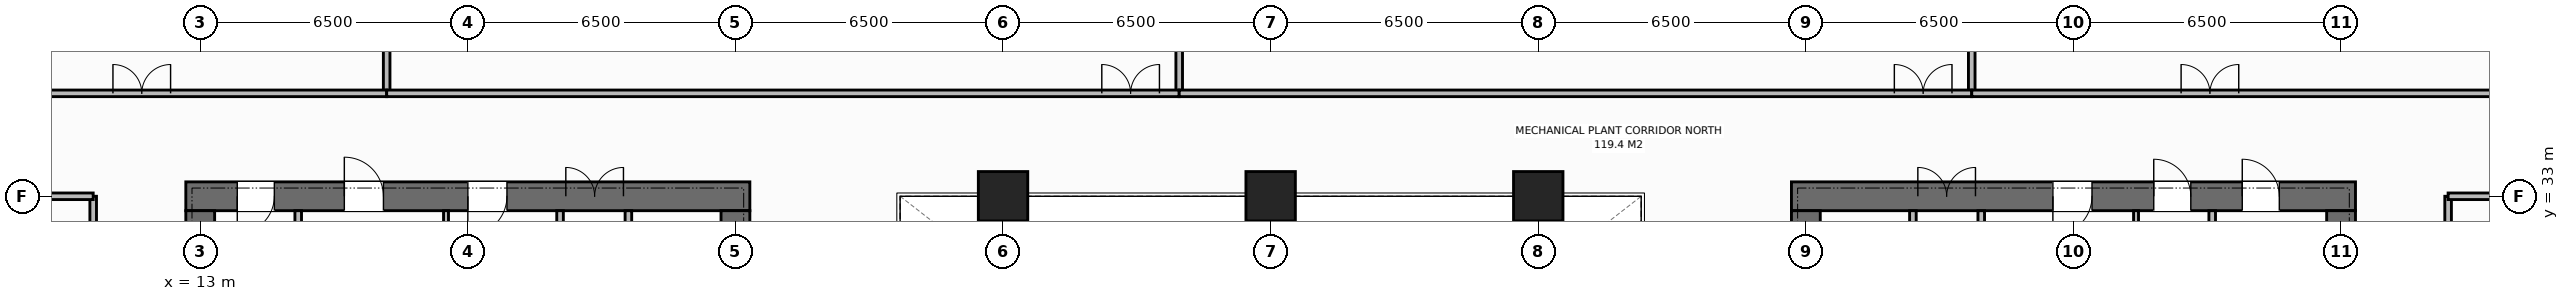
"""IFC4 building model, lengths in metres.
Left out: names, types, materials, properties, quantities, classifications, styles, units other than length and angle.
Written with IfcOpenShell. Run it as: python <this file> out.ifc"""

import sys

from ifc_helpers import new_model, si_unit, direction, frame, frame_2d, origin, origin_2d, place, context, subcontext, project, spatial, rectangle, extrude, element, fill, save


model = new_model("IFC4")
c1 = context("Model", 3, precision=1e-05, world=origin(), true_north=direction((0.0, 1.0)))
c2 = subcontext(c1, "Body", "Model", "MODEL_VIEW")
j1 = project(units=[si_unit("LENGTHUNIT", "METRE"), si_unit("PLANEANGLEUNIT", "RADIAN")], contexts=[c1])
p1 = place(None, origin())
s1 = spatial("IfcSite", under=j1, at=p1, CompositionType="ELEMENT")
p2 = place(p1, origin())
s2 = spatial("IfcBuilding", under=s1, at=p2, CompositionType="ELEMENT")
p3 = place(p2, frame((0.0, 0.0, 139.2)))
s3 = spatial("IfcBuildingStorey", under=s2, at=p3, CompositionType="ELEMENT", Elevation=139.2)
p4 = place(p3, frame((12.65, 33.0, 0.0), z_axis=(0.0, 0.0, 1.0), x_axis=(1.0, 0.0, 0.0)))
e1 = element("IfcWall", 1, at=p4, inside=s3, PredefinedType="SHEAR", context=c2, shape_type="SweptSolid", body=[
    extrude(rectangle(XDim=13.7, YDim=0.7, at=frame_2d((6.85, 0.0))), origin(), (0.0, 0.0, 1.0), 5.0),
])
p5 = place(p4, frame((1.25, 0.0, 0.0)))
e2 = element("IfcOpeningElement", 2, at=p5, cuts=e1, PredefinedType="OPENING", context=c2, shape_type="SweptSolid", body=[
    extrude(rectangle(XDim=0.9, YDim=2.15, at=frame_2d((0.45, 1.075))), frame((0.0, 0.36, 0.0), z_axis=(0.0, -1.0, 0.0), x_axis=(1.0, 0.0, 0.0)), (0.0, 0.0, 1.0), 0.72),
])
p6 = place(p4, frame((3.85, 0.0, 0.0)))
e3 = element("IfcOpeningElement", 3, at=p6, cuts=e1, PredefinedType="OPENING", context=c2, shape_type="SweptSolid", body=[
    extrude(rectangle(XDim=0.95, YDim=2.15, at=frame_2d((0.475, 1.075))), frame((0.0, 0.36, 0.0), z_axis=(0.0, -1.0, 0.0), x_axis=(1.0, 0.0, 0.0)), (0.0, 0.0, 1.0), 0.72),
])
p7 = place(p4, frame((6.85, 0.0, 0.0)))
e4 = element("IfcOpeningElement", 4, at=p7, cuts=e1, PredefinedType="OPENING", context=c2, shape_type="SweptSolid", body=[
    extrude(rectangle(XDim=0.95, YDim=2.15, at=frame_2d((0.475, 1.075))), frame((0.0, 0.36, 0.0), z_axis=(0.0, -1.0, 0.0), x_axis=(1.0, 0.0, 0.0)), (0.0, 0.0, 1.0), 0.72),
])
p8 = place(p4, frame((9.23, 0.0, 0.0)))
e5 = element("IfcOpeningElement", 5, at=p8, cuts=e1, PredefinedType="OPENING", context=c2, shape_type="SweptSolid", body=[
    extrude(rectangle(XDim=1.4, YDim=2.2, at=frame_2d((0.7, 1.1))), frame((0.0, 0.36, 0.0), z_axis=(0.0, -1.0, 0.0), x_axis=(1.0, 0.0, 0.0)), (0.0, 0.0, 1.0), 0.72),
])
p9 = place(p3, frame((13.0, 19.35, 0.0), z_axis=(0.0, 0.0, 1.0), x_axis=(0.0, 1.0, 0.0)))
e6 = element("IfcWall", 6, at=p9, inside=s3, PredefinedType="SHEAR", context=c2, shape_type="SweptSolid", body=[
    extrude(rectangle(XDim=13.3, YDim=0.7, at=frame_2d((6.65, 0.0))), origin(), (0.0, 0.0, 1.0), 5.0),
])
p10 = place(p9, frame((4.7, 0.0, 0.0)))
e7 = element("IfcOpeningElement", 7, at=p10, cuts=e6, PredefinedType="OPENING", context=c2, shape_type="SweptSolid", body=[
    extrude(rectangle(XDim=1.4, YDim=2.2, at=frame_2d((0.7, 1.1))), frame((0.0, 0.36, 0.0), z_axis=(0.0, -1.0, 0.0), x_axis=(1.0, 0.0, 0.0)), (0.0, 0.0, 1.0), 0.72),
])
p11 = place(p3, frame((26.0, 19.35, 0.0), z_axis=(0.0, 0.0, 1.0), x_axis=(0.0, 1.0, 0.0)))
e8 = element("IfcWall", 8, at=p11, inside=s3, PredefinedType="SHEAR", context=c2, shape_type="SweptSolid", body=[
    extrude(rectangle(XDim=13.3, YDim=0.7, at=frame_2d((6.65, 0.0))), origin(), (0.0, 0.0, 1.0), 5.0),
])
p12 = place(p3, frame((51.65, 33.0, 0.0), z_axis=(0.0, 0.0, 1.0), x_axis=(1.0, 0.0, 0.0)))
e9 = element("IfcWall", 9, at=p12, inside=s3, PredefinedType="SHEAR", context=c2, shape_type="SweptSolid", body=[
    extrude(rectangle(XDim=13.7, YDim=0.7, at=frame_2d((6.85, 0.0))), origin(), (0.0, 0.0, 1.0), 5.0),
])
p13 = place(p12, frame((3.07, 0.0, 0.0)))
e10 = element("IfcOpeningElement", 10, at=p13, cuts=e9, PredefinedType="OPENING", context=c2, shape_type="SweptSolid", body=[
    extrude(rectangle(XDim=1.4, YDim=2.2, at=frame_2d((0.7, 1.1))), frame((0.0, 0.36, 0.0), z_axis=(0.0, -1.0, 0.0), x_axis=(1.0, 0.0, 0.0)), (0.0, 0.0, 1.0), 0.72),
])
p14 = place(p12, frame((10.95, 0.0, 0.0)))
e11 = element("IfcOpeningElement", 11, at=p14, cuts=e9, PredefinedType="OPENING", context=c2, shape_type="SweptSolid", body=[
    extrude(rectangle(XDim=0.9, YDim=2.15, at=frame_2d((0.45, 1.075))), frame((0.0, 0.36, 0.0), z_axis=(0.0, -1.0, 0.0), x_axis=(1.0, 0.0, 0.0)), (0.0, 0.0, 1.0), 0.72),
])
p15 = place(p12, frame((6.35, 0.0, 0.0)))
e12 = element("IfcOpeningElement", 12, at=p15, cuts=e9, PredefinedType="OPENING", context=c2, shape_type="SweptSolid", body=[
    extrude(rectangle(XDim=0.95, YDim=2.15, at=frame_2d((0.475, 1.075))), frame((0.0, 0.36, 0.0), z_axis=(0.0, -1.0, 0.0), x_axis=(1.0, 0.0, 0.0)), (0.0, 0.0, 1.0), 0.72),
])
p16 = place(p12, frame((8.8, 0.0, 0.0)))
e13 = element("IfcOpeningElement", 13, at=p16, cuts=e9, PredefinedType="OPENING", context=c2, shape_type="SweptSolid", body=[
    extrude(rectangle(XDim=0.9, YDim=2.15, at=frame_2d((0.45, 1.075))), frame((0.0, 0.36, 0.0), z_axis=(0.0, -1.0, 0.0), x_axis=(1.0, 0.0, 0.0)), (0.0, 0.0, 1.0), 0.72),
])
p17 = place(p3, frame((52.0, 19.35, 0.0), z_axis=(0.0, 0.0, 1.0), x_axis=(0.0, 1.0, 0.0)))
e14 = element("IfcWall", 14, at=p17, inside=s3, PredefinedType="SHEAR", context=c2, shape_type="SweptSolid", body=[
    extrude(rectangle(XDim=13.3, YDim=0.7, at=frame_2d((6.65, 0.0))), origin(), (0.0, 0.0, 1.0), 5.0),
])
p18 = place(p3, frame((65.0, 19.35, 0.0), z_axis=(0.0, 0.0, 1.0), x_axis=(0.0, 1.0, 0.0)))
e15 = element("IfcWall", 15, at=p18, inside=s3, PredefinedType="SHEAR", context=c2, shape_type="SweptSolid", body=[
    extrude(rectangle(XDim=13.3, YDim=0.7, at=frame_2d((6.65, 0.0))), origin(), (0.0, 0.0, 1.0), 5.0),
])
p19 = place(p18, frame((8.1, 0.0, 0.0)))
e16 = element("IfcOpeningElement", 16, at=p19, cuts=e15, PredefinedType="OPENING", context=c2, shape_type="SweptSolid", body=[
    extrude(rectangle(XDim=1.3, YDim=2.2, at=frame_2d((0.65, 1.1))), frame((0.0, 0.36, 0.0), z_axis=(0.0, -1.0, 0.0), x_axis=(1.0, 0.0, 0.0)), (0.0, 0.0, 1.0), 0.72),
])
for number, where, z_axis, x_axis in (
    (17, (32.5, 33.0, 0.0), (0.0, 0.0, 1.0), (1.0, 0.0, 0.0)),
    (18, (39.0, 33.0, 0.0), (0.0, 0.0, 1.0), (1.0, 0.0, 0.0)),
    (19, (45.5, 33.0, 0.0), (0.0, 0.0, 1.0), (1.0, 0.0, 0.0)),
):
    element("IfcColumn", number, at=place(p3, frame(where, z_axis=z_axis, x_axis=x_axis)), inside=s3, PredefinedType="COLUMN", context=c2, shape_type="SweptSolid", body=[
        extrude(rectangle(XDim=1.2, YDim=1.2, at=origin_2d()), origin(), (0.0, 0.0, 1.0), 5.0),
    ])
p20 = place(p3, frame((15.38, 26.56, 0.0), z_axis=(0.0, 0.0, 1.0), x_axis=(0.0, 1.0, 0.0)))
e20 = element("IfcWall", 20, at=p20, inside=s3, PredefinedType="STANDARD", context=c2, shape_type="SweptSolid", body=[
    extrude(rectangle(XDim=6.09, YDim=0.16, at=frame_2d((3.045, 0.0))), origin(), (0.0, 0.0, 1.0), 4.772),
])
p21 = place(p3, frame((18.97, 26.56, 0.0), z_axis=(0.0, 0.0, 1.0), x_axis=(0.0, 1.0, 0.0)))
e21 = element("IfcWall", 21, at=p21, inside=s3, PredefinedType="PARTITIONING", context=c2, shape_type="SweptSolid", body=[
    extrude(rectangle(XDim=6.09, YDim=0.12, at=frame_2d((3.045, 0.0))), origin(), (0.0, 0.0, 1.0), 4.772),
])
p22 = place(p3, frame((21.74, 26.56, 0.0), z_axis=(0.0, 0.0, 1.0), x_axis=(0.0, 1.0, 0.0)))
e22 = element("IfcWall", 22, at=p22, inside=s3, PredefinedType="STANDARD", context=c2, shape_type="SweptSolid", body=[
    extrude(rectangle(XDim=6.09, YDim=0.16, at=frame_2d((3.045, 0.0))), origin(), (0.0, 0.0, 1.0), 4.772),
])
p23 = place(p3, frame((23.4, 19.35, 0.0), z_axis=(0.0, 0.0, 1.0), x_axis=(0.0, 1.0, 0.0)))
e23 = element("IfcWall", 23, at=p23, inside=s3, PredefinedType="STANDARD", context=c2, shape_type="SweptSolid", body=[
    extrude(rectangle(XDim=13.3, YDim=0.16, at=frame_2d((6.65, 0.0))), origin(), (0.0, 0.0, 1.0), 4.772),
])
p24 = place(p23, frame((1.65, 0.0, 0.0)))
e24 = element("IfcOpeningElement", 24, at=p24, cuts=e23, PredefinedType="OPENING", context=c2, shape_type="SweptSolid", body=[
    extrude(rectangle(XDim=0.95, YDim=2.15, at=frame_2d((0.475, 1.075))), frame((0.0, 0.09, 0.0), z_axis=(0.0, -1.0, 0.0), x_axis=(1.0, 0.0, 0.0)), (0.0, 0.0, 1.0), 0.18),
])
p25 = place(p23, frame((4.95, 0.0, 0.0)))
e25 = element("IfcOpeningElement", 25, at=p25, cuts=e23, PredefinedType="OPENING", context=c2, shape_type="SweptSolid", body=[
    extrude(rectangle(XDim=1.1, YDim=2.2, at=frame_2d((0.55, 1.1))), frame((0.0, 0.09, 0.0), z_axis=(0.0, -1.0, 0.0), x_axis=(1.0, 0.0, 0.0)), (0.0, 0.0, 1.0), 0.18),
])
p26 = place(p23, frame((7.1, 0.0, 0.0)))
e26 = element("IfcOpeningElement", 26, at=p26, cuts=e23, PredefinedType="OPENING", context=c2, shape_type="SweptSolid", body=[
    extrude(rectangle(XDim=1.1, YDim=2.2, at=frame_2d((0.55, 1.1))), frame((0.0, 0.09, 0.0), z_axis=(0.0, -1.0, 0.0), x_axis=(1.0, 0.0, 0.0)), (0.0, 0.0, 1.0), 0.18),
])
p27 = place(p3, frame((54.6, 19.35, 0.0), z_axis=(0.0, 0.0, 1.0), x_axis=(0.0, 1.0, 0.0)))
e27 = element("IfcWall", 27, at=p27, inside=s3, PredefinedType="STANDARD", context=c2, shape_type="SweptSolid", body=[
    extrude(rectangle(XDim=13.3, YDim=0.16, at=frame_2d((6.65, 0.0))), origin(), (0.0, 0.0, 1.0), 4.772),
])
p28 = place(p27, frame((1.65, 0.0, 0.0)))
e28 = element("IfcOpeningElement", 28, at=p28, cuts=e27, PredefinedType="OPENING", context=c2, shape_type="SweptSolid", body=[
    extrude(rectangle(XDim=0.95, YDim=2.15, at=frame_2d((0.475, 1.075))), frame((0.0, 0.09, 0.0), z_axis=(0.0, -1.0, 0.0), x_axis=(1.0, 0.0, 0.0)), (0.0, 0.0, 1.0), 0.18),
])
p29 = place(p27, frame((4.95, 0.0, 0.0)))
e29 = element("IfcOpeningElement", 29, at=p29, cuts=e27, PredefinedType="OPENING", context=c2, shape_type="SweptSolid", body=[
    extrude(rectangle(XDim=1.1, YDim=2.2, at=frame_2d((0.55, 1.1))), frame((0.0, 0.09, 0.0), z_axis=(0.0, -1.0, 0.0), x_axis=(1.0, 0.0, 0.0)), (0.0, 0.0, 1.0), 0.18),
])
p30 = place(p27, frame((7.1, 0.0, 0.0)))
e30 = element("IfcOpeningElement", 30, at=p30, cuts=e27, PredefinedType="OPENING", context=c2, shape_type="SweptSolid", body=[
    extrude(rectangle(XDim=1.1, YDim=2.2, at=frame_2d((0.55, 1.1))), frame((0.0, 0.09, 0.0), z_axis=(0.0, -1.0, 0.0), x_axis=(1.0, 0.0, 0.0)), (0.0, 0.0, 1.0), 0.18),
])
p31 = place(p3, frame((56.26, 23.09, 0.0), z_axis=(0.0, 0.0, 1.0), x_axis=(0.0, 1.0, 0.0)))
e31 = element("IfcWall", 31, at=p31, inside=s3, PredefinedType="STANDARD", context=c2, shape_type="SweptSolid", body=[
    extrude(rectangle(XDim=9.56, YDim=0.16, at=frame_2d((4.78, 0.0))), origin(), (0.0, 0.0, 1.0), 4.772),
])
p32 = place(p31, frame((1.01, 0.0, 0.0)))
e32 = element("IfcOpeningElement", 32, at=p32, cuts=e31, PredefinedType="OPENING", context=c2, shape_type="SweptSolid", body=[
    extrude(rectangle(XDim=1.3, YDim=2.2, at=frame_2d((0.65, 1.1))), frame((0.0, 0.09, 0.0), z_axis=(0.0, -1.0, 0.0), x_axis=(1.0, 0.0, 0.0)), (0.0, 0.0, 1.0), 0.18),
])
p33 = place(p3, frame((61.87, 26.56, 0.0), z_axis=(0.0, 0.0, 1.0), x_axis=(0.0, 1.0, 0.0)))
e33 = element("IfcWall", 33, at=p33, inside=s3, PredefinedType="STANDARD", context=c2, shape_type="SweptSolid", body=[
    extrude(rectangle(XDim=6.09, YDim=0.16, at=frame_2d((3.045, 0.0))), origin(), (0.0, 0.0, 1.0), 4.772),
])
p34 = place(p3, frame((60.02, 26.56, 0.0), z_axis=(0.0, 0.0, 1.0), x_axis=(0.0, 1.0, 0.0)))
e34 = element("IfcWall", 34, at=p34, inside=s3, PredefinedType="PARTITIONING", context=c2, shape_type="SweptSolid", body=[
    extrude(rectangle(XDim=6.09, YDim=0.12, at=frame_2d((3.045, 0.0))), origin(), (0.0, 0.0, 1.0), 4.772),
])
p35 = place(p3, frame((10.4, 19.0, 0.0), z_axis=(0.0, 0.0, 1.0), x_axis=(0.0, 1.0, 0.0)))
e35 = element("IfcWall", 35, at=p35, inside=s3, PredefinedType="STANDARD", context=c2, shape_type="SweptSolid", body=[
    extrude(rectangle(XDim=14.0, YDim=0.16, at=frame_2d((7.0, 0.0))), origin(), (0.0, 0.0, 1.0), 4.772),
])
p36 = place(p35, frame((5.2, 0.0, 0.0)))
e36 = element("IfcOpeningElement", 36, at=p36, cuts=e35, PredefinedType="OPENING", context=c2, shape_type="SweptSolid", body=[
    extrude(rectangle(XDim=1.4, YDim=2.2, at=frame_2d((0.7, 1.1))), frame((0.0, 0.09, 0.0), z_axis=(0.0, -1.0, 0.0), x_axis=(1.0, 0.0, 0.0)), (0.0, 0.0, 1.0), 0.18),
])
p37 = place(p3, frame((1.82, 33.0, 0.0), z_axis=(0.0, 0.0, 1.0), x_axis=(1.0, 0.0, 0.0)))
e37 = element("IfcWall", 37, at=p37, inside=s3, PredefinedType="STANDARD", context=c2, shape_type="SweptSolid", body=[
    extrude(rectangle(XDim=8.58, YDim=0.16, at=frame_2d((4.29, 0.0))), origin(), (0.0, 0.0, 1.0), 3.252),
])
p38 = place(p3, frame((67.6, 19.0, 0.0), z_axis=(0.0, 0.0, 1.0), x_axis=(0.0, 1.0, 0.0)))
e38 = element("IfcWall", 38, at=p38, inside=s3, PredefinedType="STANDARD", context=c2, shape_type="SweptSolid", body=[
    extrude(rectangle(XDim=14.0, YDim=0.16, at=frame_2d((7.0, 0.0))), origin(), (0.0, 0.0, 1.0), 4.772),
])
p39 = place(p38, frame((5.2, 0.0, 0.0)))
e39 = element("IfcOpeningElement", 39, at=p39, cuts=e38, PredefinedType="OPENING", context=c2, shape_type="SweptSolid", body=[
    extrude(rectangle(XDim=1.4, YDim=2.2, at=frame_2d((0.7, 1.1))), frame((0.0, 0.09, 0.0), z_axis=(0.0, -1.0, 0.0), x_axis=(1.0, 0.0, 0.0)), (0.0, 0.0, 1.0), 0.18),
])
p40 = place(p3, frame((67.6, 33.0, 0.0), z_axis=(0.0, 0.0, 1.0), x_axis=(1.0, 0.0, 0.0)))
e40 = element("IfcWall", 40, at=p40, inside=s3, PredefinedType="STANDARD", context=c2, shape_type="SweptSolid", body=[
    extrude(rectangle(XDim=8.58, YDim=0.16, at=frame_2d((4.29, 0.0))), origin(), (0.0, 0.0, 1.0), 3.252),
])
p41 = place(p3, frame((17.528, 35.5, 0.0), z_axis=(0.0, 0.0, 1.0), x_axis=(0.0, 1.0, 0.0)))
e41 = element("IfcWall", 41, at=p41, inside=s3, PredefinedType="STANDARD", context=c2, shape_type="SweptSolid", body=[
    extrude(rectangle(XDim=13.71, YDim=0.16, at=frame_2d((6.855, 0.0))), origin(), (0.0, 0.0, 1.0), 4.772),
])
p42 = place(p3, frame((1.82, 35.5, 0.0), z_axis=(0.0, 0.0, 1.0), x_axis=(1.0, 0.0, 0.0)))
e42 = element("IfcWall", 42, at=p42, inside=s3, PredefinedType="STANDARD", context=c2, shape_type="SweptSolid", body=[
    extrude(rectangle(XDim=15.708, YDim=0.16, at=frame_2d((7.854, 0.0))), origin(), (0.0, 0.0, 1.0), 4.772),
])
p43 = place(p42, frame((9.06, 0.0, 0.0)))
e43 = element("IfcOpeningElement", 43, at=p43, cuts=e42, PredefinedType="OPENING", context=c2, shape_type="SweptSolid", body=[
    extrude(rectangle(XDim=1.4, YDim=2.2, at=frame_2d((0.7, 1.1))), frame((0.0, 0.09, 0.0), z_axis=(0.0, -1.0, 0.0), x_axis=(1.0, 0.0, 0.0)), (0.0, 0.0, 1.0), 0.18),
])
p44 = place(p3, frame((36.779, 35.5, 0.0), z_axis=(0.0, 0.0, 1.0), x_axis=(0.0, 1.0, 0.0)))
e44 = element("IfcWall", 44, at=p44, inside=s3, PredefinedType="STANDARD", context=c2, shape_type="SweptSolid", body=[
    extrude(rectangle(XDim=13.71, YDim=0.16, at=frame_2d((6.855, 0.0))), origin(), (0.0, 0.0, 1.0), 4.772),
])
p45 = place(p3, frame((17.528, 35.5, 0.0), z_axis=(0.0, 0.0, 1.0), x_axis=(1.0, 0.0, 0.0)))
e45 = element("IfcWall", 45, at=p45, inside=s3, PredefinedType="STANDARD", context=c2, shape_type="SweptSolid", body=[
    extrude(rectangle(XDim=19.25, YDim=0.16, at=frame_2d((9.625, 0.0))), origin(), (0.0, 0.0, 1.0), 4.772),
])
p46 = place(p45, frame((17.37, 0.0, 0.0)))
e46 = element("IfcOpeningElement", 46, at=p46, cuts=e45, PredefinedType="OPENING", context=c2, shape_type="SweptSolid", body=[
    extrude(rectangle(XDim=1.4, YDim=2.2, at=frame_2d((0.7, 1.1))), frame((0.0, 0.09, 0.0), z_axis=(0.0, -1.0, 0.0), x_axis=(1.0, 0.0, 0.0)), (0.0, 0.0, 1.0), 0.18),
])
p47 = place(p3, frame((56.029, 35.5, 0.0), z_axis=(0.0, 0.0, 1.0), x_axis=(0.0, 1.0, 0.0)))
e47 = element("IfcWall", 47, at=p47, inside=s3, PredefinedType="STANDARD", context=c2, shape_type="SweptSolid", body=[
    extrude(rectangle(XDim=13.71, YDim=0.16, at=frame_2d((6.855, 0.0))), origin(), (0.0, 0.0, 1.0), 4.772),
])
p48 = place(p3, frame((36.779, 35.5, 0.0), z_axis=(0.0, 0.0, 1.0), x_axis=(1.0, 0.0, 0.0)))
e48 = element("IfcWall", 48, at=p48, inside=s3, PredefinedType="STANDARD", context=c2, shape_type="SweptSolid", body=[
    extrude(rectangle(XDim=19.25, YDim=0.16, at=frame_2d((9.625, 0.0))), origin(), (0.0, 0.0, 1.0), 4.772),
])
p49 = place(p48, frame((17.37, 0.0, 0.0)))
e49 = element("IfcOpeningElement", 49, at=p49, cuts=e48, PredefinedType="OPENING", context=c2, shape_type="SweptSolid", body=[
    extrude(rectangle(XDim=1.4, YDim=2.2, at=frame_2d((0.7, 1.1))), frame((0.0, 0.09, 0.0), z_axis=(0.0, -1.0, 0.0), x_axis=(1.0, 0.0, 0.0)), (0.0, 0.0, 1.0), 0.18),
])
p50 = place(p3, frame((56.029, 35.5, 0.0), z_axis=(0.0, 0.0, 1.0), x_axis=(1.0, 0.0, 0.0)))
e50 = element("IfcWall", 50, at=p50, inside=s3, PredefinedType="STANDARD", context=c2, shape_type="SweptSolid", body=[
    extrude(rectangle(XDim=20.151, YDim=0.16, at=frame_2d((10.075, 0.0))), origin(), (0.0, 0.0, 1.0), 4.772),
])
p51 = place(p50, frame((5.085, 0.0, 0.0)))
e51 = element("IfcOpeningElement", 51, at=p51, cuts=e50, PredefinedType="OPENING", context=c2, shape_type="SweptSolid", body=[
    extrude(rectangle(XDim=1.4, YDim=2.2, at=frame_2d((0.7, 1.1))), frame((0.0, 0.09, 0.0), z_axis=(0.0, -1.0, 0.0), x_axis=(1.0, 0.0, 0.0)), (0.0, 0.0, 1.0), 0.18),
])
p52 = place(p5, origin())
e52 = element("IfcDoor", 52, at=p52, inside=s3, OperationType="SINGLE_SWING_RIGHT", PredefinedType="DOOR", context=c2, shape_type="SweptSolid", body=[
    extrude(rectangle(XDim=0.9, YDim=2.15, at=frame_2d((0.45, 1.075))), frame((0.0, -0.075, 0.0), z_axis=(0.0, -1.0, 0.0), x_axis=(1.0, 0.0, 0.0)), (0.0, 0.0, 1.0), 0.05),
])
fill(e2, e52)
p53 = place(p6, origin())
e53 = element("IfcDoor", 53, at=p53, inside=s3, OperationType="SINGLE_SWING_LEFT", PredefinedType="DOOR", context=c2, shape_type="SweptSolid", body=[
    extrude(rectangle(XDim=0.95, YDim=2.15, at=frame_2d((0.475, 1.075))), frame((0.0, -0.075, 0.0), z_axis=(0.0, -1.0, 0.0), x_axis=(1.0, 0.0, 0.0)), (0.0, 0.0, 1.0), 0.05),
])
fill(e3, e53)
p54 = place(p7, origin())
e54 = element("IfcDoor", 54, at=p54, inside=s3, OperationType="SINGLE_SWING_RIGHT", PredefinedType="DOOR", context=c2, shape_type="SweptSolid", body=[
    extrude(rectangle(XDim=0.95, YDim=2.15, at=frame_2d((0.475, 1.075))), frame((0.0, -0.075, 0.0), z_axis=(0.0, -1.0, 0.0), x_axis=(1.0, 0.0, 0.0)), (0.0, 0.0, 1.0), 0.05),
])
fill(e4, e54)
p55 = place(p8, origin())
e55 = element("IfcDoor", 55, at=p55, inside=s3, OperationType="DOUBLE_DOOR_SINGLE_SWING", PredefinedType="DOOR", context=c2, shape_type="SweptSolid", body=[
    extrude(rectangle(XDim=1.4, YDim=2.2, at=frame_2d((0.7, 1.1))), frame((0.0, -0.075, 0.0), z_axis=(0.0, -1.0, 0.0), x_axis=(1.0, 0.0, 0.0)), (0.0, 0.0, 1.0), 0.05),
])
fill(e5, e55)
p56 = place(p13, origin())
e56 = element("IfcDoor", 56, at=p56, inside=s3, OperationType="DOUBLE_DOOR_SINGLE_SWING", PredefinedType="DOOR", context=c2, shape_type="SweptSolid", body=[
    extrude(rectangle(XDim=1.4, YDim=2.2, at=frame_2d((0.7, 1.1))), frame((0.0, -0.075, 0.0), z_axis=(0.0, -1.0, 0.0), x_axis=(1.0, 0.0, 0.0)), (0.0, 0.0, 1.0), 0.05),
])
fill(e10, e56)
p57 = place(p14, origin())
e57 = element("IfcDoor", 57, at=p57, inside=s3, OperationType="SINGLE_SWING_LEFT", PredefinedType="DOOR", context=c2, shape_type="SweptSolid", body=[
    extrude(rectangle(XDim=0.9, YDim=2.15, at=frame_2d((0.45, 1.075))), frame((0.0, -0.075, 0.0), z_axis=(0.0, -1.0, 0.0), x_axis=(1.0, 0.0, 0.0)), (0.0, 0.0, 1.0), 0.05),
])
fill(e11, e57)
p58 = place(p15, origin())
e58 = element("IfcDoor", 58, at=p58, inside=s3, OperationType="SINGLE_SWING_RIGHT", PredefinedType="DOOR", context=c2, shape_type="SweptSolid", body=[
    extrude(rectangle(XDim=0.95, YDim=2.15, at=frame_2d((0.475, 1.075))), frame((0.0, -0.075, 0.0), z_axis=(0.0, -1.0, 0.0), x_axis=(1.0, 0.0, 0.0)), (0.0, 0.0, 1.0), 0.05),
])
fill(e12, e58)
p59 = place(p16, origin())
e59 = element("IfcDoor", 59, at=p59, inside=s3, OperationType="SINGLE_SWING_LEFT", PredefinedType="DOOR", context=c2, shape_type="SweptSolid", body=[
    extrude(rectangle(XDim=0.9, YDim=2.15, at=frame_2d((0.45, 1.075))), frame((0.0, -0.075, 0.0), z_axis=(0.0, -1.0, 0.0), x_axis=(1.0, 0.0, 0.0)), (0.0, 0.0, 1.0), 0.05),
])
fill(e13, e59)
p60 = place(p43, origin())
e60 = element("IfcDoor", 60, at=p60, inside=s3, OperationType="DOUBLE_DOOR_SINGLE_SWING", PredefinedType="DOOR", context=c2, shape_type="SweptSolid", body=[
    extrude(rectangle(XDim=1.4, YDim=2.2, at=frame_2d((0.7, 1.1))), frame((0.0, 0.025, 0.0), z_axis=(0.0, -1.0, 0.0), x_axis=(1.0, 0.0, 0.0)), (0.0, 0.0, 1.0), 0.05),
])
fill(e43, e60)
p61 = place(p46, origin())
e61 = element("IfcDoor", 61, at=p61, inside=s3, OperationType="DOUBLE_DOOR_SINGLE_SWING", PredefinedType="DOOR", context=c2, shape_type="SweptSolid", body=[
    extrude(rectangle(XDim=1.4, YDim=2.2, at=frame_2d((0.7, 1.1))), frame((0.0, 0.025, 0.0), z_axis=(0.0, -1.0, 0.0), x_axis=(1.0, 0.0, 0.0)), (0.0, 0.0, 1.0), 0.05),
])
fill(e46, e61)
p62 = place(p49, origin())
e62 = element("IfcDoor", 62, at=p62, inside=s3, OperationType="DOUBLE_DOOR_SINGLE_SWING", PredefinedType="DOOR", context=c2, shape_type="SweptSolid", body=[
    extrude(rectangle(XDim=1.4, YDim=2.2, at=frame_2d((0.7, 1.1))), frame((0.0, 0.025, 0.0), z_axis=(0.0, -1.0, 0.0), x_axis=(1.0, 0.0, 0.0)), (0.0, 0.0, 1.0), 0.05),
])
fill(e49, e62)
p63 = place(p51, origin())
e63 = element("IfcDoor", 63, at=p63, inside=s3, OperationType="DOUBLE_DOOR_SINGLE_SWING", PredefinedType="DOOR", context=c2, shape_type="SweptSolid", body=[
    extrude(rectangle(XDim=1.4, YDim=2.2, at=frame_2d((0.7, 1.1))), frame((0.0, 0.025, 0.0), z_axis=(0.0, -1.0, 0.0), x_axis=(1.0, 0.0, 0.0)), (0.0, 0.0, 1.0), 0.05),
])
fill(e51, e63)
save(model, sys.argv[1])
